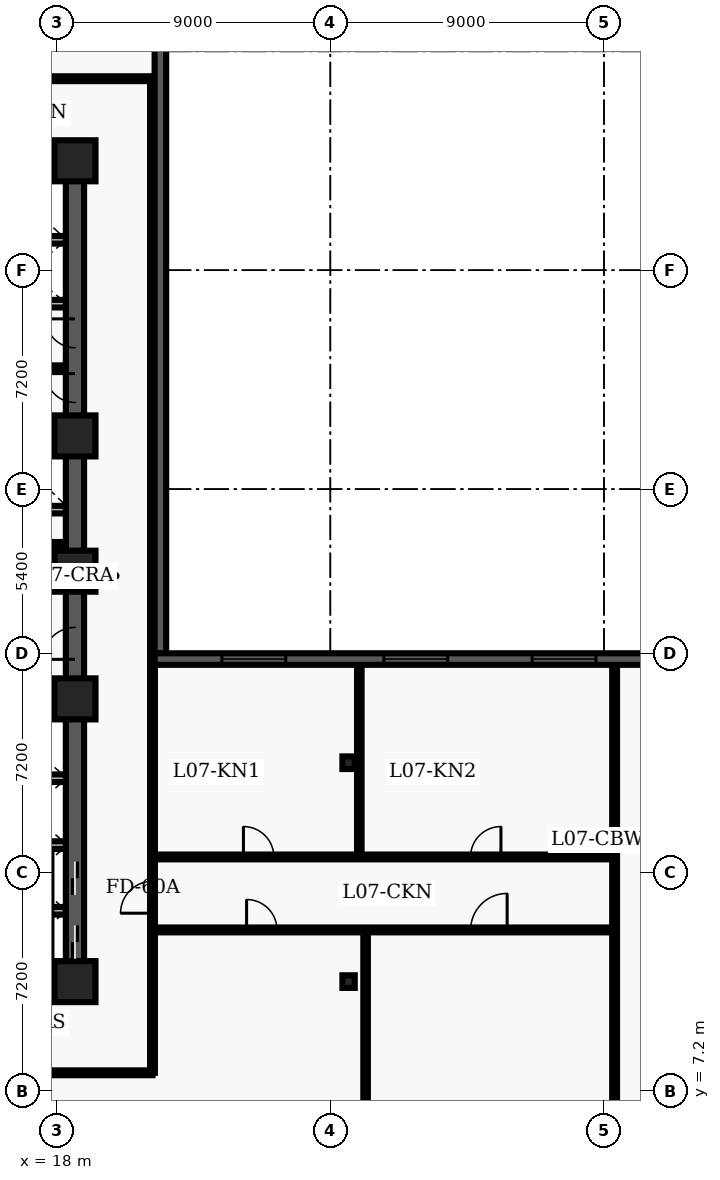
"""IFC4 building model, lengths in metres.
Left out: names, types, materials, properties, quantities, classifications, styles, units other than length and angle.
Written with IfcOpenShell. Run it as: python <this file> out.ifc"""

import sys

from ifc_helpers import new_model, entity, si_unit, converted_unit, direction, frame, origin_with_axes, origin_2d_with_axis, place, context, subcontext, project, spatial, polyline, rectangle, i_section, outline, extrude, element, fill, save


model = new_model("IFC4")
c1 = context("Model", 3, precision=1e-05, world=origin_with_axes(), true_north=direction((0.0, 1.0)))
c2 = subcontext(c1, "Body", "Model", "MODEL_VIEW")
j1 = project(units=[si_unit("LENGTHUNIT", "METRE"), converted_unit("PLANEANGLEUNIT", "DEGREE", entity("IfcPlaneAngleMeasure", 0.017), si_unit("PLANEANGLEUNIT", "RADIAN"), dimensions=[0, 0, 0, 0, 0, 0, 0])], contexts=[c1])
p1 = place(None, origin_with_axes())
s1 = spatial("IfcSite", under=j1, at=p1, CompositionType="ELEMENT")
p2 = place(p1, origin_with_axes())
s2 = spatial("IfcBuilding", under=s1, at=p2, CompositionType="ELEMENT")
p3 = place(p2, frame((0.0, 0.0, 32.7), z_axis=(0.0, 0.0, 1.0), x_axis=(1.0, 0.0, 0.0)))
s3 = spatial("IfcBuildingStorey", under=s2, at=p3, CompositionType="ELEMENT", Elevation=32.7)
p4 = place(p3, frame((11.4, 10.8, 0.0), z_axis=(0.0, 0.0, 1.0), x_axis=(1.0, 0.0, 0.0)))
e1 = element("IfcWall", 1, at=p4, inside=s3, PredefinedType="SHEAR", context=c2, shape_type="SweptSolid", body=[
    extrude(outline(polyline([(0.0, -0.3), (7.2, -0.3), (7.2, 0.3), (0.0, 0.3), (0.0, -0.3)])), origin_with_axes(), (0.0, 0.0, 1.0), 3.66),
])
p5 = place(p4, frame((2.625, 0.0, 0.0), z_axis=(0.0, 0.0, 1.0), x_axis=(1.0, 0.0, 0.0)))
e2 = element("IfcOpeningElement", 2, at=p5, cuts=e1, PredefinedType="OPENING", context=c2, shape_type="SweptSolid", body=[
    extrude(rectangle(XDim=1.05, YDim=0.62, at=origin_2d_with_axis()), origin_with_axes(), (0.0, 0.0, 1.0), 2.15),
])
p6 = place(p3, frame((11.4, 37.8, 0.0), z_axis=(0.0, 0.0, 1.0), x_axis=(1.0, 0.0, 0.0)))
e3 = element("IfcWall", 3, at=p6, inside=s3, PredefinedType="SHEAR", context=c2, shape_type="SweptSolid", body=[
    extrude(outline(polyline([(0.0, -0.3), (7.2, -0.3), (7.2, 0.3), (0.0, 0.3), (0.0, -0.3)])), origin_with_axes(), (0.0, 0.0, 1.0), 3.66),
])
p7 = place(p6, frame((2.625, 0.0, 0.0), z_axis=(0.0, 0.0, 1.0), x_axis=(1.0, 0.0, 0.0)))
e4 = element("IfcOpeningElement", 4, at=p7, cuts=e3, PredefinedType="OPENING", context=c2, shape_type="SweptSolid", body=[
    extrude(rectangle(XDim=1.05, YDim=0.62, at=origin_2d_with_axis()), origin_with_axes(), (0.0, 0.0, 1.0), 2.15),
])
p8 = place(p3, frame((18.6, 10.8, 0.0), z_axis=(0.0, 0.0, 1.0), x_axis=(0.0, 1.0, 0.0)))
e5 = element("IfcWall", 5, at=p8, inside=s3, PredefinedType="SHEAR", context=c2, shape_type="SweptSolid", body=[
    extrude(outline(polyline([(0.0, -0.3), (13.5, -0.3), (13.5, 0.3), (0.0, 0.3), (0.0, -0.3)])), origin_with_axes(), (0.0, 0.0, 1.0), 3.66),
])
p9 = place(p8, frame((1.3, 0.0, 0.0), z_axis=(0.0, 0.0, 1.0), x_axis=(1.0, 0.0, 0.0)))
e6 = element("IfcOpeningElement", 6, at=p9, cuts=e5, PredefinedType="OPENING", context=c2, shape_type="SweptSolid", body=[
    extrude(rectangle(XDim=1.1, YDim=0.62, at=origin_2d_with_axis()), origin_with_axes(), (0.0, 0.0, 1.0), 2.15),
])
p10 = place(p8, frame((3.4, 0.0, 0.0), z_axis=(0.0, 0.0, 1.0), x_axis=(1.0, 0.0, 0.0)))
e7 = element("IfcOpeningElement", 7, at=p10, cuts=e5, PredefinedType="OPENING", context=c2, shape_type="SweptSolid", body=[
    extrude(rectangle(XDim=1.1, YDim=0.62, at=origin_2d_with_axis()), origin_with_axes(), (0.0, 0.0, 1.0), 2.15),
])
p11 = place(p8, frame((11.125, 0.0, 0.0), z_axis=(0.0, 0.0, 1.0), x_axis=(1.0, 0.0, 0.0)))
e8 = element("IfcOpeningElement", 8, at=p11, cuts=e5, PredefinedType="OPENING", context=c2, shape_type="SweptSolid", body=[
    extrude(rectangle(XDim=1.05, YDim=0.62, at=origin_2d_with_axis()), origin_with_axes(), (0.0, 0.0, 1.0), 2.15),
])
p12 = place(p3, frame((18.6, 24.3, 0.0), z_axis=(0.0, 0.0, 1.0), x_axis=(0.0, 1.0, 0.0)))
e9 = element("IfcWall", 9, at=p12, inside=s3, PredefinedType="SHEAR", context=c2, shape_type="SweptSolid", body=[
    extrude(outline(polyline([(0.0, -0.3), (13.5, -0.3), (13.5, 0.3), (0.0, 0.3), (0.0, -0.3)])), origin_with_axes(), (0.0, 0.0, 1.0), 3.66),
])
p13 = place(p12, frame((6.025, 0.0, 0.0), z_axis=(0.0, 0.0, 1.0), x_axis=(1.0, 0.0, 0.0)))
e10 = element("IfcOpeningElement", 10, at=p13, cuts=e9, PredefinedType="OPENING", context=c2, shape_type="SweptSolid", body=[
    extrude(rectangle(XDim=0.95, YDim=0.62, at=origin_2d_with_axis()), origin_with_axes(), (0.0, 0.0, 1.0), 2.15),
])
p14 = place(p12, frame((7.825, 0.0, 0.0), z_axis=(0.0, 0.0, 1.0), x_axis=(1.0, 0.0, 0.0)))
e11 = element("IfcOpeningElement", 11, at=p14, cuts=e9, PredefinedType="OPENING", context=c2, shape_type="SweptSolid", body=[
    extrude(rectangle(XDim=0.95, YDim=0.62, at=origin_2d_with_axis()), origin_with_axes(), (0.0, 0.0, 1.0), 2.15),
])
for number, where, z_axis, x_axis in (
    (12, (11.7, 19.825, 0.0), (0.0, 0.0, 1.0), (1.0, 0.0, 0.0)),
    (13, (11.7, 28.775, 0.0), (0.0, 0.0, 1.0), (1.0, 0.0, 0.0)),
):
    element("IfcWall", number, at=place(p3, frame(where, z_axis=z_axis, x_axis=x_axis)), inside=s3, PredefinedType="SHEAR", context=c2, shape_type="SweptSolid", body=[
        extrude(outline(polyline([(0.0, -0.125), (6.6, -0.125), (6.6, 0.125), (0.0, 0.125), (0.0, -0.125)])), origin_with_axes(), (0.0, 0.0, 1.0), 3.66),
    ])
p15 = place(p3, frame((11.7, 24.1, 0.0), z_axis=(0.0, 0.0, 1.0), x_axis=(1.0, 0.0, 0.0)))
e14 = element("IfcWall", 14, at=p15, inside=s3, PredefinedType="SOLIDWALL", context=c2, shape_type="SweptSolid", body=[
    extrude(outline(polyline([(0.0, -0.125), (6.6, -0.125), (6.6, 0.125), (0.0, 0.125), (0.0, -0.125)])), origin_with_axes(), (0.0, 0.0, 1.0), 2.7),
])
p16 = place(p15, frame((3.75, 0.0, 0.0), z_axis=(0.0, 0.0, 1.0), x_axis=(1.0, 0.0, 0.0)))
e15 = element("IfcOpeningElement", 15, at=p16, cuts=e14, PredefinedType="OPENING", context=c2, shape_type="SweptSolid", body=[
    extrude(rectangle(XDim=0.9, YDim=0.27, at=origin_2d_with_axis()), origin_with_axes(), (0.0, 0.0, 1.0), 2.15),
])
p17 = place(p3, frame((11.7, 26.325, 0.0), z_axis=(0.0, 0.0, 1.0), x_axis=(1.0, 0.0, 0.0)))
e16 = element("IfcWall", 16, at=p17, inside=s3, PredefinedType="SOLIDWALL", context=c2, shape_type="SweptSolid", body=[
    extrude(outline(polyline([(0.0, -0.125), (6.6, -0.125), (6.6, 0.125), (0.0, 0.125), (0.0, -0.125)])), origin_with_axes(), (0.0, 0.0, 1.0), 2.7),
])
p18 = place(p17, frame((3.5, 0.0, 0.0), z_axis=(0.0, 0.0, 1.0), x_axis=(1.0, 0.0, 0.0)))
e17 = element("IfcOpeningElement", 17, at=p18, cuts=e16, PredefinedType="OPENING", context=c2, shape_type="SweptSolid", body=[
    extrude(rectangle(XDim=0.9, YDim=0.27, at=origin_2d_with_axis()), origin_with_axes(), (0.0, 0.0, 1.0), 2.15),
])
for number, where, z_axis, x_axis in (
    (18, (18.6, 10.8, 0.0), (0.0, 0.0, 1.0), (1.0, 0.0, 0.0)),
    (19, (18.6, 20.1, 0.0), (0.0, 0.0, 1.0), (1.0, 0.0, 0.0)),
    (20, (18.6, 24.3, 0.0), (0.0, 0.0, 1.0), (1.0, 0.0, 0.0)),
    (21, (18.6, 28.75, 0.0), (0.0, 0.0, 1.0), (1.0, 0.0, 0.0)),
    (22, (18.6, 37.8, 0.0), (0.0, 0.0, 1.0), (1.0, 0.0, 0.0)),
):
    element("IfcColumn", number, at=place(p3, frame(where, z_axis=z_axis, x_axis=x_axis)), inside=s3, PredefinedType="COLUMN", context=c2, shape_type="SweptSolid", body=[
        extrude(rectangle(XDim=1.35, YDim=1.35, at=origin_2d_with_axis()), origin_with_axes(), (0.0, 0.0, 1.0), 3.9),
    ])
for number, where, z_axis, x_axis in (
    (23, (27.6, 10.8, 0.0), (0.0, 0.0, 1.0), (1.0, 0.0, 0.0)),
    (24, (27.6, 18.0, 0.0), (0.0, 0.0, 1.0), (1.0, 0.0, 0.0)),
):
    element("IfcColumn", number, at=place(p3, frame(where, z_axis=z_axis, x_axis=x_axis)), inside=s3, PredefinedType="COLUMN", context=c2, shape_type="SweptSolid", body=[
        extrude(i_section(OverallWidth=0.406, OverallDepth=0.416, WebThickness=0.03, FlangeThickness=0.048, FilletRadius=0.022, at=origin_2d_with_axis()), origin_with_axes(), (0.0, 0.0, 1.0), 3.9),
    ])
p19 = place(p3, frame((14.62, 25.18, 0.0), z_axis=(0.0, 0.0, 1.0), x_axis=(1.0, 0.0, 0.0)))
e25 = element("IfcWall", 25, at=p19, inside=s3, PredefinedType="PARTITIONING", context=c2, shape_type="SweptSolid", body=[
    extrude(outline(polyline([(0.0, -0.08), (3.68, -0.08), (3.68, 0.08), (0.0, 0.08), (0.0, -0.08)])), origin_with_axes(), (0.0, 0.0, 1.0), 2.7),
])
p20 = place(p19, frame((1.95, 0.0, 0.0), z_axis=(0.0, 0.0, 1.0), x_axis=(1.0, 0.0, 0.0)))
e26 = element("IfcOpeningElement", 26, at=p20, cuts=e25, PredefinedType="OPENING", context=c2, shape_type="SweptSolid", body=[
    extrude(rectangle(XDim=0.9, YDim=0.18, at=origin_2d_with_axis()), origin_with_axes(), (0.0, 0.0, 1.0), 2.15),
])
for number, where, z_axis, x_axis in (
    (27, (15.84, 13.13, 0.0), (0.0, 0.0, 1.0), (1.0, 0.0, 0.0)),
    (28, (15.84, 15.29, 0.0), (0.0, 0.0, 1.0), (1.0, 0.0, 0.0)),
    (29, (15.84, 17.49, 0.0), (0.0, 0.0, 1.0), (1.0, 0.0, 0.0)),
    (30, (15.84, 33.1, 0.0), (0.0, 0.0, 1.0), (1.0, 0.0, 0.0)),
    (31, (15.84, 35.2, 0.0), (0.0, 0.0, 1.0), (1.0, 0.0, 0.0)),
):
    element("IfcWall", number, at=place(p3, frame(where, z_axis=z_axis, x_axis=x_axis)), inside=s3, PredefinedType="SOLIDWALL", context=c2, shape_type="SweptSolid", body=[
        extrude(outline(polyline([(0.0, -0.125), (2.46, -0.125), (2.46, 0.125), (0.0, 0.125), (0.0, -0.125)])), origin_with_axes(), (0.0, 0.0, 1.0), 2.7),
    ])
p21 = place(p3, frame((15.84, 31.0, 0.0), z_axis=(0.0, 0.0, 1.0), x_axis=(1.0, 0.0, 0.0)))
e32 = element("IfcWall", 32, at=p21, inside=s3, PredefinedType="PARTITIONING", context=c2, shape_type="SweptSolid", body=[
    extrude(outline(polyline([(0.0, -0.07), (2.46, -0.07), (2.46, 0.07), (0.0, 0.07), (0.0, -0.07)])), origin_with_axes(), (0.0, 0.0, 1.0), 2.7),
])
p22 = place(p3, frame((2.6, 7.8, 0.0), z_axis=(0.0, 0.0, 1.0), x_axis=(1.0, 0.0, 0.0)))
e33 = element("IfcWall", 33, at=p22, inside=s3, PredefinedType="PARTITIONING", context=c2, shape_type="SweptSolid", body=[
    extrude(outline(polyline([(0.0, -0.08), (18.55, -0.08), (18.55, 0.08), (0.0, 0.08), (0.0, -0.08)])), origin_with_axes(), (0.0, 0.0, 1.0), 2.7),
])
p23 = place(p22, frame((3.768, 0.0, 0.0), z_axis=(0.0, 0.0, 1.0), x_axis=(1.0, 0.0, 0.0)))
e34 = element("IfcOpeningElement", 34, at=p23, cuts=e33, PredefinedType="OPENING", context=c2, shape_type="SweptSolid", body=[
    extrude(rectangle(XDim=1.0, YDim=0.18, at=origin_2d_with_axis()), origin_with_axes(), (0.0, 0.0, 1.0), 2.15),
])
p24 = place(p22, frame((13.303, 0.0, 0.0), z_axis=(0.0, 0.0, 1.0), x_axis=(1.0, 0.0, 0.0)))
e35 = element("IfcOpeningElement", 35, at=p24, cuts=e33, PredefinedType="OPENING", context=c2, shape_type="SweptSolid", body=[
    extrude(rectangle(XDim=1.0, YDim=0.18, at=origin_2d_with_axis()), origin_with_axes(), (0.0, 0.0, 1.0), 2.15),
])
p25 = place(p3, frame((2.6, 40.5, 0.0), z_axis=(0.0, 0.0, 1.0), x_axis=(1.0, 0.0, 0.0)))
e36 = element("IfcWall", 36, at=p25, inside=s3, PredefinedType="PARTITIONING", context=c2, shape_type="SweptSolid", body=[
    extrude(outline(polyline([(0.0, -0.08), (18.65, -0.08), (18.65, 0.08), (0.0, 0.08), (0.0, -0.08)])), origin_with_axes(), (0.0, 0.0, 1.0), 2.7),
])
p26 = place(p25, frame((4.395, 0.0, 0.0), z_axis=(0.0, 0.0, 1.0), x_axis=(1.0, 0.0, 0.0)))
e37 = element("IfcOpeningElement", 37, at=p26, cuts=e36, PredefinedType="OPENING", context=c2, shape_type="SweptSolid", body=[
    extrude(rectangle(XDim=1.2, YDim=0.18, at=origin_2d_with_axis()), origin_with_axes(), (0.0, 0.0, 1.0), 2.2),
])
p27 = place(p25, frame((12.61, 0.0, 0.0), z_axis=(0.0, 0.0, 1.0), x_axis=(1.0, 0.0, 0.0)))
e38 = element("IfcOpeningElement", 38, at=p27, cuts=e36, PredefinedType="OPENING", context=c2, shape_type="SweptSolid", body=[
    extrude(rectangle(XDim=1.0, YDim=0.18, at=origin_2d_with_axis()), origin_with_axes(), (0.0, 0.0, 1.0), 2.15),
])
p28 = place(p3, frame((21.15, 7.8, 0.0), z_axis=(0.0, 0.0, 1.0), x_axis=(0.0, 1.0, 0.0)))
e39 = element("IfcWall", 39, at=p28, inside=s3, PredefinedType="PARTITIONING", context=c2, shape_type="SweptSolid", body=[
    extrude(outline(polyline([(0.0, -0.08), (32.7, -0.08), (32.7, 0.08), (0.0, 0.08), (0.0, -0.08)])), origin_with_axes(), (0.0, 0.0, 1.0), 2.7),
])
p29 = place(p28, frame((5.775, 0.0, 0.0), z_axis=(0.0, 0.0, 1.0), x_axis=(1.0, 0.0, 0.0)))
e40 = element("IfcOpeningElement", 40, at=p29, cuts=e39, PredefinedType="OPENING", context=c2, shape_type="SweptSolid", body=[
    extrude(rectangle(XDim=1.05, YDim=0.18, at=origin_2d_with_axis()), origin_with_axes(), (0.0, 0.0, 1.0), 2.15),
])
p30 = place(p3, frame((21.15, 12.5, 0.0), z_axis=(0.0, 0.0, 1.0), x_axis=(1.0, 0.0, 0.0)))
e41 = element("IfcWall", 41, at=p30, inside=s3, PredefinedType="PARTITIONING", context=c2, shape_type="SweptSolid", body=[
    extrude(outline(polyline([(0.0, -0.08), (15.2, -0.08), (15.2, 0.08), (0.0, 0.08), (0.0, -0.08)])), origin_with_axes(), (0.0, 0.0, 1.0), 2.7),
])
p31 = place(p30, frame((3.595, 0.0, 0.0), z_axis=(0.0, 0.0, 1.0), x_axis=(1.0, 0.0, 0.0)))
e42 = element("IfcOpeningElement", 42, at=p31, cuts=e41, PredefinedType="OPENING", context=c2, shape_type="SweptSolid", body=[
    extrude(rectangle(XDim=1.0, YDim=0.18, at=origin_2d_with_axis()), origin_with_axes(), (0.0, 0.0, 1.0), 2.15),
])
p32 = place(p30, frame((11.065, 0.0, 0.0), z_axis=(0.0, 0.0, 1.0), x_axis=(1.0, 0.0, 0.0)))
e43 = element("IfcOpeningElement", 43, at=p32, cuts=e41, PredefinedType="OPENING", context=c2, shape_type="SweptSolid", body=[
    extrude(rectangle(XDim=1.2, YDim=0.18, at=origin_2d_with_axis()), origin_with_axes(), (0.0, 0.0, 1.0), 2.2),
])
p33 = place(p3, frame((21.15, 14.9, 0.0), z_axis=(0.0, 0.0, 1.0), x_axis=(1.0, 0.0, 0.0)))
e44 = element("IfcWall", 44, at=p33, inside=s3, PredefinedType="PARTITIONING", context=c2, shape_type="SweptSolid", body=[
    extrude(outline(polyline([(0.0, -0.08), (15.2, -0.08), (15.2, 0.08), (0.0, 0.08), (0.0, -0.08)])), origin_with_axes(), (0.0, 0.0, 1.0), 2.7),
])
p34 = place(p33, frame((3.491, 0.0, 0.0), z_axis=(0.0, 0.0, 1.0), x_axis=(1.0, 0.0, 0.0)))
e45 = element("IfcOpeningElement", 45, at=p34, cuts=e44, PredefinedType="OPENING", context=c2, shape_type="SweptSolid", body=[
    extrude(rectangle(XDim=1.0, YDim=0.18, at=origin_2d_with_axis()), origin_with_axes(), (0.0, 0.0, 1.0), 2.15),
])
p35 = place(p33, frame((10.961, 0.0, 0.0), z_axis=(0.0, 0.0, 1.0), x_axis=(1.0, 0.0, 0.0)))
e46 = element("IfcOpeningElement", 46, at=p35, cuts=e44, PredefinedType="OPENING", context=c2, shape_type="SweptSolid", body=[
    extrude(rectangle(XDim=1.0, YDim=0.18, at=origin_2d_with_axis()), origin_with_axes(), (0.0, 0.0, 1.0), 2.15),
])
p36 = place(p3, frame((36.35, 4.35, 0.0), z_axis=(0.0, 0.0, 1.0), x_axis=(0.0, 1.0, 0.0)))
e47 = element("IfcWall", 47, at=p36, inside=s3, PredefinedType="PARTITIONING", context=c2, shape_type="SweptSolid", body=[
    extrude(outline(polyline([(0.0, -0.08), (16.95, -0.08), (16.95, 0.08), (0.0, 0.08), (0.0, -0.08)])), origin_with_axes(), (0.0, 0.0, 1.0), 2.7),
])
p37 = place(p3, frame((28.16, 0.36, 0.0), z_axis=(0.0, 0.0, 1.0), x_axis=(0.0, 1.0, 0.0)))
e48 = element("IfcWall", 48, at=p37, inside=s3, PredefinedType="PARTITIONING", context=c2, shape_type="SweptSolid", body=[
    extrude(outline(polyline([(0.0, -0.075), (12.02, -0.075), (12.02, 0.075), (0.0, 0.075), (0.0, -0.075)])), origin_with_axes(), (0.0, 0.0, 1.0), 2.7),
])
p38 = place(p3, frame((27.953, 15.02, 0.0), z_axis=(0.0, 0.0, 1.0), x_axis=(0.0, 1.0, 0.0)))
e49 = element("IfcWall", 49, at=p38, inside=s3, PredefinedType="PARTITIONING", context=c2, shape_type="SweptSolid", body=[
    extrude(outline(polyline([(0.0, -0.075), (6.205, -0.075), (6.205, 0.075), (0.0, 0.075), (0.0, -0.075)])), origin_with_axes(), (0.0, 0.0, 1.0), 2.7),
])
p39 = place(p3, frame((21.41, 45.82, 0.0), z_axis=(0.0, 0.0, 1.0), x_axis=(0.0, -1.0, 0.0)))
e50 = element("IfcWall", 50, at=p39, inside=s3, PredefinedType="SOLIDWALL", context=c2, shape_type="SweptSolid", body=[
    extrude(outline(polyline([(0.0, -0.19), (24.22, -0.19), (24.22, 0.19), (0.0, 0.19), (0.0, -0.19)])), origin_with_axes(), (0.0, 0.0, 1.0), 3.66),
])
p40 = place(p39, frame((2.902, 0.0, 0.45), z_axis=(0.0, 0.0, 1.0), x_axis=(1.0, 0.0, 0.0)))
e51 = element("IfcOpeningElement", 51, at=p40, cuts=e50, PredefinedType="OPENING", context=c2, shape_type="SweptSolid", body=[
    extrude(rectangle(XDim=2.1, YDim=0.4, at=origin_2d_with_axis()), origin_with_axes(), (0.0, 0.0, 1.0), 2.2),
])
p41 = place(p3, frame((21.22, 21.41, 0.0), z_axis=(0.0, 0.0, 1.0), x_axis=(1.0, 0.0, 0.0)))
e52 = element("IfcWall", 52, at=p41, inside=s3, PredefinedType="SOLIDWALL", context=c2, shape_type="SweptSolid", body=[
    extrude(outline(polyline([(0.0, -0.19), (17.18, -0.19), (17.18, 0.19), (0.0, 0.19), (0.0, -0.19)])), origin_with_axes(), (0.0, 0.0, 1.0), 3.66),
])
p42 = place(p41, frame((3.263, 0.0, 0.45), z_axis=(0.0, 0.0, 1.0), x_axis=(1.0, 0.0, 0.0)))
e53 = element("IfcOpeningElement", 53, at=p42, cuts=e52, PredefinedType="OPENING", context=c2, shape_type="SweptSolid", body=[
    extrude(rectangle(XDim=2.1, YDim=0.4, at=origin_2d_with_axis()), origin_with_axes(), (0.0, 0.0, 1.0), 2.2),
])
p43 = place(p41, frame((8.59, 0.0, 0.45), z_axis=(0.0, 0.0, 1.0), x_axis=(1.0, 0.0, 0.0)))
e54 = element("IfcOpeningElement", 54, at=p43, cuts=e52, PredefinedType="OPENING", context=c2, shape_type="SweptSolid", body=[
    extrude(rectangle(XDim=2.1, YDim=0.4, at=origin_2d_with_axis()), origin_with_axes(), (0.0, 0.0, 1.0), 2.2),
])
p44 = place(p41, frame((13.467, 0.0, 0.45), z_axis=(0.0, 0.0, 1.0), x_axis=(1.0, 0.0, 0.0)))
e55 = element("IfcOpeningElement", 55, at=p44, cuts=e52, PredefinedType="OPENING", context=c2, shape_type="SweptSolid", body=[
    extrude(rectangle(XDim=2.1, YDim=0.4, at=origin_2d_with_axis()), origin_with_axes(), (0.0, 0.0, 1.0), 2.2),
])
p45 = place(p8, frame((1.3, 0.0, 0.0), z_axis=(0.0, 0.0, 1.0), x_axis=(1.0, 0.0, 0.0)))
e56 = element("IfcDoor", 56, at=p45, inside=s3, OperationType="SLIDING_TO_LEFT", PredefinedType="DOOR", context=c2, shape_type="SweptSolid", body=[
    extrude(rectangle(XDim=1.1, YDim=0.09, at=origin_2d_with_axis()), origin_with_axes(), (0.0, 0.0, 1.0), 2.15),
])
fill(e6, e56)
p46 = place(p8, frame((3.4, 0.0, 0.0), z_axis=(0.0, 0.0, 1.0), x_axis=(1.0, 0.0, 0.0)))
e57 = element("IfcDoor", 57, at=p46, inside=s3, OperationType="SLIDING_TO_RIGHT", PredefinedType="DOOR", context=c2, shape_type="SweptSolid", body=[
    extrude(rectangle(XDim=1.1, YDim=0.09, at=origin_2d_with_axis()), origin_with_axes(), (0.0, 0.0, 1.0), 2.15),
])
fill(e7, e57)
p47 = place(p8, frame((11.125, 0.0, 0.0), z_axis=(0.0, 0.0, 1.0), x_axis=(1.0, 0.0, 0.0)))
e58 = element("IfcDoor", 58, at=p47, inside=s3, OperationType="SINGLE_SWING_LEFT", PredefinedType="DOOR", context=c2, shape_type="SweptSolid", body=[
    extrude(rectangle(XDim=1.05, YDim=0.09, at=origin_2d_with_axis()), origin_with_axes(), (0.0, 0.0, 1.0), 2.15),
])
fill(e8, e58)
p48 = place(p12, frame((6.025, 0.0, 0.0), z_axis=(0.0, 0.0, 1.0), x_axis=(1.0, 0.0, 0.0)))
e59 = element("IfcDoor", 59, at=p48, inside=s3, OperationType="SINGLE_SWING_RIGHT", PredefinedType="DOOR", context=c2, shape_type="SweptSolid", body=[
    extrude(rectangle(XDim=0.95, YDim=0.09, at=origin_2d_with_axis()), origin_with_axes(), (0.0, 0.0, 1.0), 2.15),
])
fill(e10, e59)
p49 = place(p12, frame((7.825, 0.0, 0.0), z_axis=(0.0, 0.0, 1.0), x_axis=(1.0, 0.0, 0.0)))
e60 = element("IfcDoor", 60, at=p49, inside=s3, OperationType="SINGLE_SWING_RIGHT", PredefinedType="DOOR", context=c2, shape_type="SweptSolid", body=[
    extrude(rectangle(XDim=0.95, YDim=0.09, at=origin_2d_with_axis()), origin_with_axes(), (0.0, 0.0, 1.0), 2.15),
])
fill(e11, e60)
p50 = place(p28, frame((5.775, 0.0, 0.0), z_axis=(0.0, 0.0, 1.0), x_axis=(1.0, 0.0, 0.0)))
e61 = element("IfcDoor", 61, at=p50, inside=s3, OperationType="SINGLE_SWING_LEFT", PredefinedType="DOOR", context=c2, shape_type="SweptSolid", body=[
    extrude(rectangle(XDim=1.05, YDim=0.09, at=origin_2d_with_axis()), origin_with_axes(), (0.0, 0.0, 1.0), 2.15),
])
fill(e40, e61)
p51 = place(p30, frame((3.595, 0.0, 0.0), z_axis=(0.0, 0.0, 1.0), x_axis=(1.0, 0.0, 0.0)))
e62 = element("IfcDoor", 62, at=p51, inside=s3, OperationType="SINGLE_SWING_LEFT", PredefinedType="DOOR", context=c2, shape_type="SweptSolid", body=[
    extrude(rectangle(XDim=1.0, YDim=0.09, at=origin_2d_with_axis()), origin_with_axes(), (0.0, 0.0, 1.0), 2.15),
])
fill(e42, e62)
p52 = place(p30, frame((11.065, 0.0, 0.0), z_axis=(0.0, 0.0, 1.0), x_axis=(1.0, 0.0, 0.0)))
e63 = element("IfcDoor", 63, at=p52, inside=s3, OperationType="SINGLE_SWING_RIGHT", PredefinedType="DOOR", context=c2, shape_type="SweptSolid", body=[
    extrude(rectangle(XDim=1.2, YDim=0.09, at=origin_2d_with_axis()), origin_with_axes(), (0.0, 0.0, 1.0), 2.2),
])
fill(e43, e63)
p53 = place(p33, frame((3.491, 0.0, 0.0), z_axis=(0.0, 0.0, 1.0), x_axis=(1.0, 0.0, 0.0)))
e64 = element("IfcDoor", 64, at=p53, inside=s3, OperationType="SINGLE_SWING_LEFT", PredefinedType="DOOR", context=c2, shape_type="SweptSolid", body=[
    extrude(rectangle(XDim=1.0, YDim=0.09, at=origin_2d_with_axis()), origin_with_axes(), (0.0, 0.0, 1.0), 2.15),
])
fill(e45, e64)
p54 = place(p33, frame((10.961, 0.0, 0.0), z_axis=(0.0, 0.0, 1.0), x_axis=(1.0, 0.0, 0.0)))
e65 = element("IfcDoor", 65, at=p54, inside=s3, OperationType="SINGLE_SWING_RIGHT", PredefinedType="DOOR", context=c2, shape_type="SweptSolid", body=[
    extrude(rectangle(XDim=1.0, YDim=0.09, at=origin_2d_with_axis()), origin_with_axes(), (0.0, 0.0, 1.0), 2.15),
])
fill(e46, e65)
p55 = place(p41, frame((3.263, 0.0, 0.45), z_axis=(0.0, 0.0, 1.0), x_axis=(1.0, 0.0, 0.0)))
e66 = element("IfcWindow", 66, at=p55, inside=s3, PredefinedType="WINDOW", context=c2, shape_type="SweptSolid", body=[
    extrude(rectangle(XDim=2.1, YDim=0.09, at=origin_2d_with_axis()), origin_with_axes(), (0.0, 0.0, 1.0), 2.2),
])
fill(e53, e66)
p56 = place(p41, frame((8.59, 0.0, 0.45), z_axis=(0.0, 0.0, 1.0), x_axis=(1.0, 0.0, 0.0)))
e67 = element("IfcWindow", 67, at=p56, inside=s3, PredefinedType="WINDOW", context=c2, shape_type="SweptSolid", body=[
    extrude(rectangle(XDim=2.1, YDim=0.09, at=origin_2d_with_axis()), origin_with_axes(), (0.0, 0.0, 1.0), 2.2),
])
fill(e54, e67)
p57 = place(p41, frame((13.467, 0.0, 0.45), z_axis=(0.0, 0.0, 1.0), x_axis=(1.0, 0.0, 0.0)))
e68 = element("IfcWindow", 68, at=p57, inside=s3, PredefinedType="WINDOW", context=c2, shape_type="SweptSolid", body=[
    extrude(rectangle(XDim=2.1, YDim=0.09, at=origin_2d_with_axis()), origin_with_axes(), (0.0, 0.0, 1.0), 2.2),
])
fill(e55, e68)
save(model, sys.argv[1])
